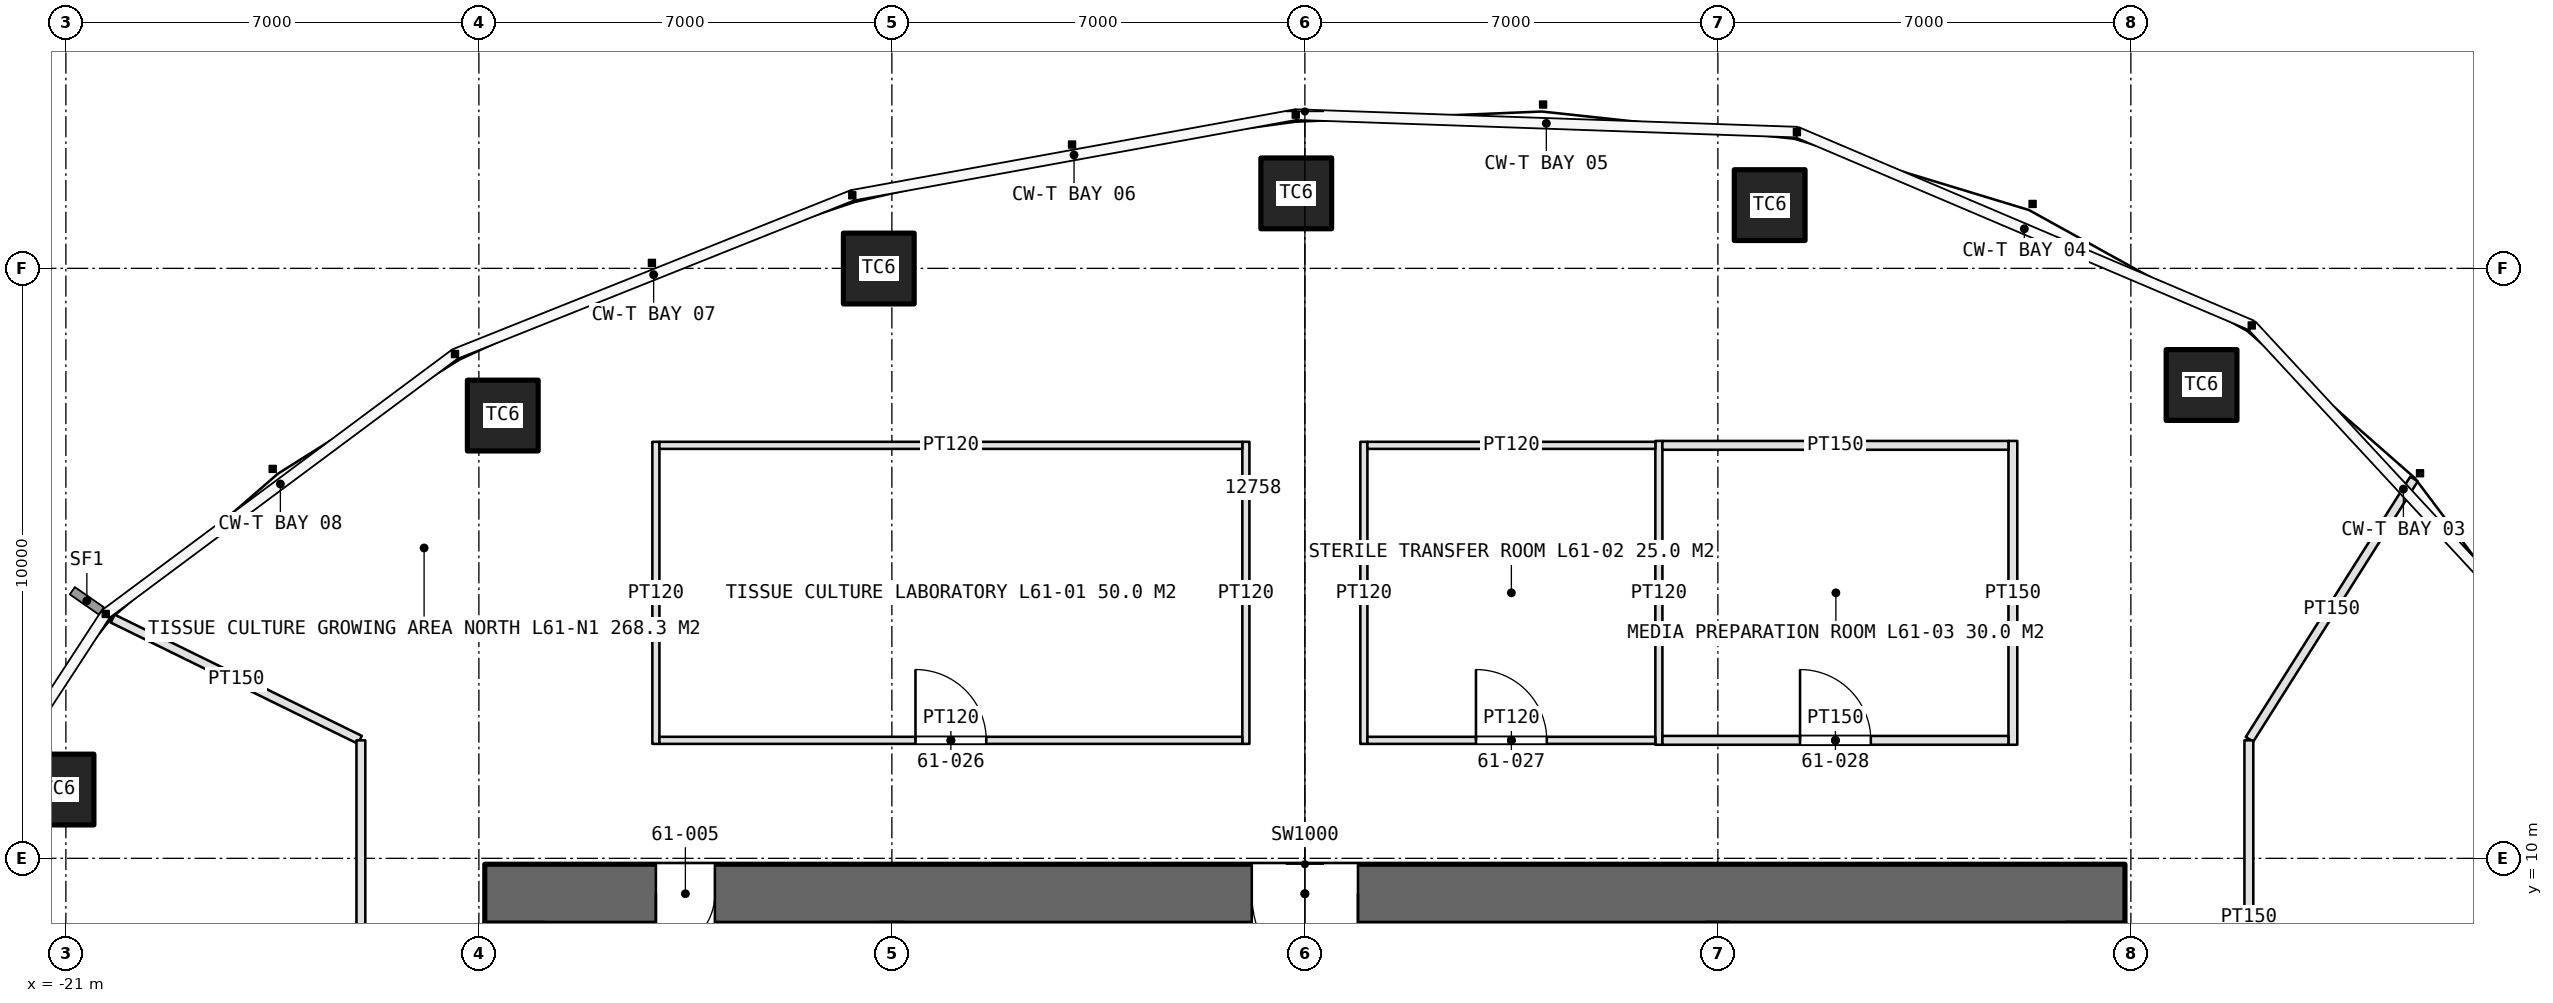
"""IFC4 building model, lengths in metres.
Left out: names, types, materials, properties, quantities, classifications, styles, units other than length and angle.
Written with IfcOpenShell. Run it as: python <this file> out.ifc"""

import sys

from ifc_helpers import new_model, si_unit, direction, frame, frame_2d, origin, origin_2d, place, context, subcontext, project, spatial, rectangle, extrude, element, fill, save


model = new_model("IFC4")
c1 = context("Model", 3, precision=1e-05, world=origin(), true_north=direction((0.0, 1.0)))
c2 = subcontext(c1, "Body", "Model", "MODEL_VIEW")
j1 = project(units=[si_unit("LENGTHUNIT", "METRE"), si_unit("PLANEANGLEUNIT", "RADIAN")], contexts=[c1])
p1 = place(None, origin())
s1 = spatial("IfcSite", under=j1, at=p1, CompositionType="ELEMENT")
p2 = place(p1, origin())
s2 = spatial("IfcBuilding", under=s1, at=p2, CompositionType="ELEMENT")
p3 = place(p2, frame((0.0, 0.0, 275.4)))
s3 = spatial("IfcBuildingStorey", under=s2, at=p3, CompositionType="ELEMENT", Elevation=275.4)
p4 = place(p3, frame((13.9, 9.4, 0.0), z_axis=(0.0, 0.0, 1.0), x_axis=(-1.0, 0.0, 0.0)))
e1 = element("IfcWall", 1, at=p4, inside=s3, PredefinedType="SHEAR", context=c2, shape_type="SweptSolid", body=[
    extrude(rectangle(XDim=27.8, YDim=1.0, at=frame_2d((13.9, 0.0))), origin(), (0.0, 0.0, 1.0), 4.2),
])
p5 = place(p4, frame((23.9, 0.0, 0.0)))
e2 = element("IfcOpeningElement", 2, at=p5, cuts=e1, PredefinedType="OPENING", context=c2, shape_type="SweptSolid", body=[
    extrude(rectangle(XDim=1.0, YDim=2.4, at=frame_2d((0.5, 1.2))), frame((0.0, 0.51, 0.0), z_axis=(0.0, -1.0, 0.0), x_axis=(1.0, 0.0, 0.0)), (0.0, 0.0, 1.0), 1.02),
])
p6 = place(p4, frame((13.0, 0.0, 0.0)))
e3 = element("IfcOpeningElement", 3, at=p6, cuts=e1, PredefinedType="OPENING", context=c2, shape_type="SweptSolid", body=[
    extrude(rectangle(XDim=1.8, YDim=2.4, at=frame_2d((0.9, 1.2))), frame((0.0, 0.51, 0.0), z_axis=(0.0, -1.0, 0.0), x_axis=(1.0, 0.0, 0.0)), (0.0, 0.0, 1.0), 1.02),
])
for number, where, z_axis, x_axis in (
    (4, (15.198, 18.023, 0.0), (0.0, 0.0, 1.0), (1.0, 0.0, 0.0)),
    (5, (7.878, 21.072, 0.0), (0.0, 0.0, 1.0), (1.0, 0.0, 0.0)),
    (6, (-0.146, 21.271, 0.0), (0.0, 0.0, 1.0), (1.0, 0.0, 0.0)),
    (7, (-7.222, 19.997, 0.0), (0.0, 0.0, 1.0), (1.0, 0.0, 0.0)),
    (8, (-13.595, 17.505, 0.0), (0.0, 0.0, 1.0), (1.0, 0.0, 0.0)),
    (9, (-21.125, 11.166, 0.0), (0.0, 0.0, 1.0), (1.0, 0.0, 0.0)),
):
    element("IfcColumn", number, at=place(p3, frame(where, z_axis=z_axis, x_axis=x_axis)), inside=s3, PredefinedType="COLUMN", context=c2, shape_type="SweptSolid", body=[
        extrude(rectangle(XDim=1.2, YDim=1.2, at=origin_2d()), origin(), (0.0, 0.0, 1.0), 4.2),
    ])
for number, where, z_axis, x_axis in (
    (10, (-11.0, 11.94, 0.0), (0.0, 0.0, 1.0), (0.0, 1.0, 0.0)),
    (11, (-1.0, 11.94, 0.0), (0.0, 0.0, 1.0), (0.0, 1.0, 0.0)),
):
    element("IfcWall", number, at=place(p3, frame(where, z_axis=z_axis, x_axis=x_axis)), inside=s3, PredefinedType="PARTITIONING", context=c2, shape_type="SweptSolid", body=[
        extrude(rectangle(XDim=5.12, YDim=0.12, at=frame_2d((2.56, 0.0))), origin(), (0.0, 0.0, 1.0), 3.0),
    ])
p7 = place(p3, frame((-10.94, 12.0, 0.0), z_axis=(0.0, 0.0, 1.0), x_axis=(1.0, 0.0, 0.0)))
e12 = element("IfcWall", 12, at=p7, inside=s3, PredefinedType="PARTITIONING", context=c2, shape_type="SweptSolid", body=[
    extrude(rectangle(XDim=9.88, YDim=0.12, at=frame_2d((4.94, 0.0))), origin(), (0.0, 0.0, 1.0), 3.0),
])
p8 = place(p7, frame((4.34, 0.0, 0.0)))
e13 = element("IfcOpeningElement", 13, at=p8, cuts=e12, PredefinedType="OPENING", context=c2, shape_type="SweptSolid", body=[
    extrude(rectangle(XDim=1.2, YDim=2.3, at=frame_2d((0.6, 1.15))), frame((0.0, 0.07, 0.0), z_axis=(0.0, -1.0, 0.0), x_axis=(1.0, 0.0, 0.0)), (0.0, 0.0, 1.0), 0.14),
])
p9 = place(p3, frame((-10.94, 17.0, 0.0), z_axis=(0.0, 0.0, 1.0), x_axis=(1.0, 0.0, 0.0)))
e14 = element("IfcWall", 14, at=p9, inside=s3, PredefinedType="PARTITIONING", context=c2, shape_type="SweptSolid", body=[
    extrude(rectangle(XDim=9.88, YDim=0.12, at=frame_2d((4.94, 0.0))), origin(), (0.0, 0.0, 1.0), 3.0),
])
p10 = place(p3, frame((1.0, 11.94, 0.0), z_axis=(0.0, 0.0, 1.0), x_axis=(0.0, 1.0, 0.0)))
e15 = element("IfcWall", 15, at=p10, inside=s3, PredefinedType="PARTITIONING", context=c2, shape_type="SweptSolid", body=[
    extrude(rectangle(XDim=5.12, YDim=0.12, at=frame_2d((2.56, 0.0))), origin(), (0.0, 0.0, 1.0), 3.0),
])
p11 = place(p3, frame((6.0, 11.925, 0.0), z_axis=(0.0, 0.0, 1.0), x_axis=(0.0, 1.0, 0.0)))
e16 = element("IfcWall", 16, at=p11, inside=s3, PredefinedType="PARTITIONING", context=c2, shape_type="SweptSolid", body=[
    extrude(rectangle(XDim=5.15, YDim=0.12, at=frame_2d((2.575, 0.0))), origin(), (0.0, 0.0, 1.0), 3.0),
])
p12 = place(p3, frame((12.0, 11.925, 0.0), z_axis=(0.0, 0.0, 1.0), x_axis=(0.0, 1.0, 0.0)))
e17 = element("IfcWall", 17, at=p12, inside=s3, PredefinedType="PARTITIONING", context=c2, shape_type="SweptSolid", body=[
    extrude(rectangle(XDim=5.15, YDim=0.15, at=frame_2d((2.575, 0.0))), origin(), (0.0, 0.0, 1.0), 3.0),
])
p13 = place(p3, frame((1.06, 12.0, 0.0), z_axis=(0.0, 0.0, 1.0), x_axis=(1.0, 0.0, 0.0)))
e18 = element("IfcWall", 18, at=p13, inside=s3, PredefinedType="PARTITIONING", context=c2, shape_type="SweptSolid", body=[
    extrude(rectangle(XDim=4.88, YDim=0.12, at=frame_2d((2.44, 0.0))), origin(), (0.0, 0.0, 1.0), 3.0),
])
p14 = place(p13, frame((1.84, 0.0, 0.0)))
e19 = element("IfcOpeningElement", 19, at=p14, cuts=e18, PredefinedType="OPENING", context=c2, shape_type="SweptSolid", body=[
    extrude(rectangle(XDim=1.2, YDim=2.3, at=frame_2d((0.6, 1.15))), frame((0.0, 0.07, 0.0), z_axis=(0.0, -1.0, 0.0), x_axis=(1.0, 0.0, 0.0)), (0.0, 0.0, 1.0), 0.14),
])
p15 = place(p3, frame((1.06, 17.0, 0.0), z_axis=(0.0, 0.0, 1.0), x_axis=(1.0, 0.0, 0.0)))
e20 = element("IfcWall", 20, at=p15, inside=s3, PredefinedType="PARTITIONING", context=c2, shape_type="SweptSolid", body=[
    extrude(rectangle(XDim=4.88, YDim=0.12, at=frame_2d((2.44, 0.0))), origin(), (0.0, 0.0, 1.0), 3.0),
])
p16 = place(p3, frame((6.06, 12.0, 0.0), z_axis=(0.0, 0.0, 1.0), x_axis=(1.0, 0.0, 0.0)))
e21 = element("IfcWall", 21, at=p16, inside=s3, PredefinedType="PARTITIONING", context=c2, shape_type="SweptSolid", body=[
    extrude(rectangle(XDim=5.865, YDim=0.15, at=frame_2d((2.933, 0.0))), origin(), (0.0, 0.0, 1.0), 3.0),
])
p17 = place(p16, frame((2.333, 0.0, 0.0)))
e22 = element("IfcOpeningElement", 22, at=p17, cuts=e21, PredefinedType="OPENING", context=c2, shape_type="SweptSolid", body=[
    extrude(rectangle(XDim=1.2, YDim=2.3, at=frame_2d((0.6, 1.15))), frame((0.0, 0.085, 0.0), z_axis=(0.0, -1.0, 0.0), x_axis=(1.0, 0.0, 0.0)), (0.0, 0.0, 1.0), 0.17),
])
p18 = place(p3, frame((6.06, 17.0, 0.0), z_axis=(0.0, 0.0, 1.0), x_axis=(1.0, 0.0, 0.0)))
e23 = element("IfcWall", 23, at=p18, inside=s3, PredefinedType="PARTITIONING", context=c2, shape_type="SweptSolid", body=[
    extrude(rectangle(XDim=5.865, YDim=0.15, at=frame_2d((2.933, 0.0))), origin(), (0.0, 0.0, 1.0), 3.0),
])
p19 = place(p3, frame((-16.018, 12.009, 0.0), z_axis=(0.0, 0.0, 1.0), x_axis=(-0.897771840996, 0.440460805879, 0.0)))
e24 = element("IfcWall", 24, at=p19, inside=s3, PredefinedType="PARTITIONING", context=c2, shape_type="SweptSolid", body=[
    extrude(rectangle(XDim=4.666, YDim=0.15, at=frame_2d((2.333, 0.0))), origin(), (0.0, 0.0, 1.0), 3.0),
])
p20 = place(p3, frame((16.011, 12.017, 0.0), z_axis=(0.0, 0.0, 1.0), x_axis=(0.53415837449, 0.845384427916, 0.0)))
e25 = element("IfcWall", 25, at=p20, inside=s3, PredefinedType="PARTITIONING", context=c2, shape_type="SweptSolid", body=[
    extrude(rectangle(XDim=5.22, YDim=0.15, at=frame_2d((2.61, 0.0))), origin(), (0.0, 0.0, 1.0), 3.0),
])
p21 = place(p3, frame((16.0, 6.0, 0.0), z_axis=(0.0, 0.0, 1.0), x_axis=(0.0, 1.0, 0.0)))
e26 = element("IfcWall", 26, at=p21, inside=s3, PredefinedType="PARTITIONING", context=c2, shape_type="SweptSolid", body=[
    extrude(rectangle(XDim=6.0, YDim=0.15, at=frame_2d((3.0, 0.0))), origin(), (0.0, 0.0, 1.0), 3.0),
])
p22 = place(p3, frame((-16.0, 12.0, 0.0), z_axis=(0.0, 0.0, 1.0), x_axis=(0.0, -1.0, 0.0)))
e27 = element("IfcWall", 27, at=p22, inside=s3, PredefinedType="PARTITIONING", context=c2, shape_type="SweptSolid", body=[
    extrude(rectangle(XDim=8.0, YDim=0.15, at=frame_2d((4.0, 0.0))), origin(), (0.0, 0.0, 1.0), 3.0),
])
p23 = place(p22, frame((5.9, 0.0, 0.0)))
e28 = element("IfcOpeningElement", 28, at=p23, cuts=e27, PredefinedType="OPENING", context=c2, shape_type="SweptSolid", body=[
    extrude(rectangle(XDim=1.6, YDim=2.4, at=frame_2d((0.8, 1.2))), frame((0.0, 0.085, 0.0), z_axis=(0.0, -1.0, 0.0), x_axis=(1.0, 0.0, 0.0)), (0.0, 0.0, 1.0), 0.17),
])
p24 = place(p5, origin())
e29 = element("IfcDoor", 29, at=p24, inside=s3, OperationType="SINGLE_SWING_RIGHT", PredefinedType="DOOR", context=c2, shape_type="SweptSolid", body=[
    extrude(rectangle(XDim=1.0, YDim=2.4, at=frame_2d((0.5, 1.2))), frame((0.0, 0.025, 0.0), z_axis=(0.0, -1.0, 0.0), x_axis=(1.0, 0.0, 0.0)), (0.0, 0.0, 1.0), 0.05),
])
fill(e2, e29)
p25 = place(p6, origin())
e30 = element("IfcDoor", 30, at=p25, inside=s3, OperationType="DOUBLE_DOOR_SINGLE_SWING", PredefinedType="DOOR", context=c2, shape_type="SweptSolid", body=[
    extrude(rectangle(XDim=1.8, YDim=2.4, at=frame_2d((0.9, 1.2))), frame((0.0, 0.025, 0.0), z_axis=(0.0, -1.0, 0.0), x_axis=(1.0, 0.0, 0.0)), (0.0, 0.0, 1.0), 0.05),
])
fill(e3, e30)
p26 = place(p8, origin())
e31 = element("IfcDoor", 31, at=p26, inside=s3, OperationType="SINGLE_SWING_LEFT", PredefinedType="DOOR", context=c2, shape_type="SweptSolid", body=[
    extrude(rectangle(XDim=1.2, YDim=2.3, at=frame_2d((0.6, 1.15))), frame((0.0, 0.025, 0.0), z_axis=(0.0, -1.0, 0.0), x_axis=(1.0, 0.0, 0.0)), (0.0, 0.0, 1.0), 0.05),
])
fill(e13, e31)
p27 = place(p14, origin())
e32 = element("IfcDoor", 32, at=p27, inside=s3, OperationType="SINGLE_SWING_LEFT", PredefinedType="DOOR", context=c2, shape_type="SweptSolid", body=[
    extrude(rectangle(XDim=1.2, YDim=2.3, at=frame_2d((0.6, 1.15))), frame((0.0, 0.025, 0.0), z_axis=(0.0, -1.0, 0.0), x_axis=(1.0, 0.0, 0.0)), (0.0, 0.0, 1.0), 0.05),
])
fill(e19, e32)
p28 = place(p17, origin())
e33 = element("IfcDoor", 33, at=p28, inside=s3, OperationType="SINGLE_SWING_LEFT", PredefinedType="DOOR", context=c2, shape_type="SweptSolid", body=[
    extrude(rectangle(XDim=1.2, YDim=2.3, at=frame_2d((0.6, 1.15))), frame((0.0, 0.025, 0.0), z_axis=(0.0, -1.0, 0.0), x_axis=(1.0, 0.0, 0.0)), (0.0, 0.0, 1.0), 0.05),
])
fill(e22, e33)
save(model, sys.argv[1])
